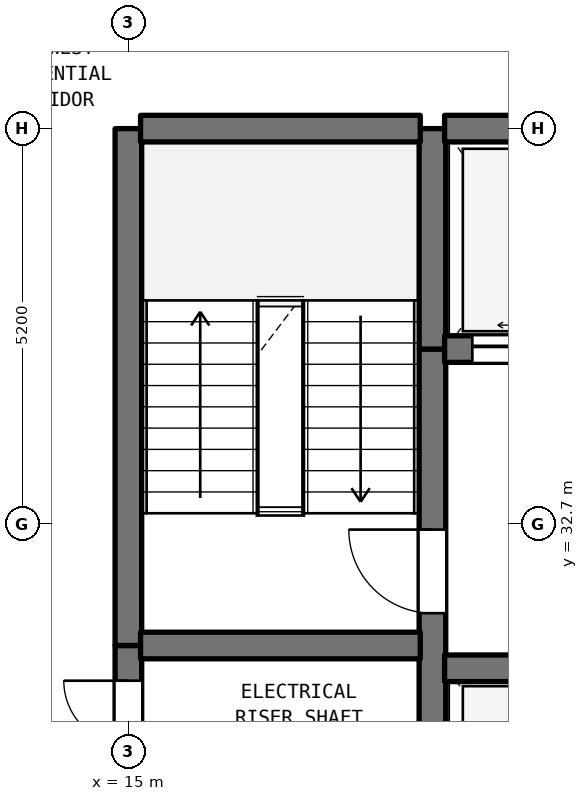
"""IFC4 building model, lengths in metres.
Left out: names, types, materials, properties, quantities, classifications, styles, units other than length and angle.
Written with IfcOpenShell. Run it as: python <this file> out.ifc"""

import sys

from ifc_helpers import new_model, si_unit, direction, frame, frame_2d, origin, place, context, subcontext, project, spatial, rectangle, extrude, element, fill, save


model = new_model("IFC4")
c1 = context("Model", 3, precision=1e-05, world=origin(), true_north=direction((0.0, 1.0)))
c2 = subcontext(c1, "Body", "Model", "MODEL_VIEW")
j1 = project(units=[si_unit("LENGTHUNIT", "METRE"), si_unit("PLANEANGLEUNIT", "RADIAN")], contexts=[c1])
p1 = place(None, origin())
s1 = spatial("IfcSite", under=j1, at=p1, CompositionType="ELEMENT")
p2 = place(p1, origin())
s2 = spatial("IfcBuilding", under=s1, at=p2, CompositionType="ELEMENT")
p3 = place(p2, frame((0.0, 0.0, 105.7)))
s3 = spatial("IfcBuildingStorey", under=s2, at=p3, CompositionType="ELEMENT", Elevation=105.7)
p4 = place(p3, frame((15.0, 29.5, 0.0), z_axis=(0.0, 0.0, 1.0), x_axis=(0.0, 1.0, 0.0)))
e1 = element("IfcWall", 1, at=p4, inside=s3, PredefinedType="SHEAR", context=c2, shape_type="SweptSolid", body=[
    extrude(rectangle(XDim=1.6, YDim=0.35, at=frame_2d((0.8, 0.0))), origin(), (0.0, 0.0, 1.0), 3.385),
])
p5 = place(p4, frame((0.287, 0.0, 0.0)))
e2 = element("IfcOpeningElement", 2, at=p5, cuts=e1, PredefinedType="OPENING", context=c2, shape_type="SweptSolid", body=[
    extrude(rectangle(XDim=0.85, YDim=2.1, at=frame_2d((0.425, 1.05))), frame((0.0, 0.185, 0.0), z_axis=(0.0, -1.0, 0.0), x_axis=(1.0, 0.0, 0.0)), (0.0, 0.0, 1.0), 0.37),
])
p6 = place(p3, frame((15.0, 31.1, 0.0), z_axis=(0.0, 0.0, 1.0), x_axis=(0.0, 1.0, 0.0)))
e3 = element("IfcWall", 3, at=p6, inside=s3, PredefinedType="SHEAR", context=c2, shape_type="SweptSolid", body=[
    extrude(rectangle(XDim=6.8, YDim=0.35, at=frame_2d((3.4, 0.0))), origin(), (0.0, 0.0, 1.0), 3.385),
])
p7 = place(p3, frame((19.0, 29.5, 0.0), z_axis=(0.0, 0.0, 1.0), x_axis=(0.0, 1.0, 0.0)))
e4 = element("IfcWall", 4, at=p7, inside=s3, PredefinedType="SHEAR", context=c2, shape_type="SweptSolid", body=[
    extrude(rectangle(XDim=5.5, YDim=0.35, at=frame_2d((2.75, 0.0))), origin(), (0.0, 0.0, 1.0), 3.385),
])
p8 = place(p7, frame((2.025, 0.0, 0.0)))
e5 = element("IfcOpeningElement", 5, at=p8, cuts=e4, PredefinedType="OPENING", context=c2, shape_type="SweptSolid", body=[
    extrude(rectangle(XDim=1.1, YDim=2.15, at=frame_2d((0.55, 1.075))), frame((0.0, 0.185, 0.0), z_axis=(0.0, -1.0, 0.0), x_axis=(1.0, 0.0, 0.0)), (0.0, 0.0, 1.0), 0.37),
])
p9 = place(p3, frame((19.0, 35.0, 0.0), z_axis=(0.0, 0.0, 1.0), x_axis=(0.0, 1.0, 0.0)))
e6 = element("IfcWall", 6, at=p9, inside=s3, PredefinedType="SHEAR", context=c2, shape_type="SweptSolid", body=[
    extrude(rectangle(XDim=2.9, YDim=0.35, at=frame_2d((1.45, 0.0))), origin(), (0.0, 0.0, 1.0), 3.385),
])
p10 = place(p3, frame((19.16, 30.8, 0.0), z_axis=(0.0, 0.0, 1.0), x_axis=(1.0, 0.0, 0.0)))
e7 = element("IfcWall", 7, at=p10, inside=s3, PredefinedType="SHEAR", context=c2, shape_type="SweptSolid", body=[
    extrude(rectangle(XDim=4.48, YDim=0.35, at=frame_2d((2.24, 0.0))), origin(), (0.0, 0.0, 1.0), 3.385),
])
p11 = place(p3, frame((15.16, 31.1, 0.0), z_axis=(0.0, 0.0, 1.0), x_axis=(1.0, 0.0, 0.0)))
e8 = element("IfcWall", 8, at=p11, inside=s3, PredefinedType="SHEAR", context=c2, shape_type="SweptSolid", body=[
    extrude(rectangle(XDim=3.68, YDim=0.35, at=frame_2d((1.84, 0.0))), origin(), (0.0, 0.0, 1.0), 3.385),
])
p12 = place(p3, frame((19.16, 35.0, 0.0), z_axis=(0.0, 0.0, 1.0), x_axis=(1.0, 0.0, 0.0)))
e9 = element("IfcWall", 9, at=p12, inside=s3, PredefinedType="SHEAR", context=c2, shape_type="SweptSolid", body=[
    extrude(rectangle(XDim=11.48, YDim=0.35, at=frame_2d((5.74, 0.0))), origin(), (0.0, 0.0, 1.0), 3.385),
])
p13 = place(p12, frame((0.365, 0.0, 0.0)))
e10 = element("IfcOpeningElement", 10, at=p13, cuts=e9, PredefinedType="OPENING", context=c2, shape_type="SweptSolid", body=[
    extrude(rectangle(XDim=1.35, YDim=2.2, at=frame_2d((0.675, 1.1))), frame((0.0, 0.185, 0.0), z_axis=(0.0, -1.0, 0.0), x_axis=(1.0, 0.0, 0.0)), (0.0, 0.0, 1.0), 0.37),
])
p14 = place(p12, frame((2.765, 0.0, 0.0)))
e11 = element("IfcOpeningElement", 11, at=p14, cuts=e9, PredefinedType="OPENING", context=c2, shape_type="SweptSolid", body=[
    extrude(rectangle(XDim=1.35, YDim=2.2, at=frame_2d((0.675, 1.1))), frame((0.0, 0.185, 0.0), z_axis=(0.0, -1.0, 0.0), x_axis=(1.0, 0.0, 0.0)), (0.0, 0.0, 1.0), 0.37),
])
p15 = place(p12, frame((4.915, 0.0, 0.0)))
e12 = element("IfcOpeningElement", 12, at=p15, cuts=e9, PredefinedType="OPENING", context=c2, shape_type="SweptSolid", body=[
    extrude(rectangle(XDim=1.2, YDim=2.2, at=frame_2d((0.6, 1.1))), frame((0.0, 0.185, 0.0), z_axis=(0.0, -1.0, 0.0), x_axis=(1.0, 0.0, 0.0)), (0.0, 0.0, 1.0), 0.37),
])
p16 = place(p12, frame((6.665, 0.0, 0.0)))
e13 = element("IfcOpeningElement", 13, at=p16, cuts=e9, PredefinedType="OPENING", context=c2, shape_type="SweptSolid", body=[
    extrude(rectangle(XDim=1.2, YDim=2.2, at=frame_2d((0.6, 1.1))), frame((0.0, 0.185, 0.0), z_axis=(0.0, -1.0, 0.0), x_axis=(1.0, 0.0, 0.0)), (0.0, 0.0, 1.0), 0.37),
])
p17 = place(p12, frame((8.415, 0.0, 0.0)))
e14 = element("IfcOpeningElement", 14, at=p17, cuts=e9, PredefinedType="OPENING", context=c2, shape_type="SweptSolid", body=[
    extrude(rectangle(XDim=1.2, YDim=2.2, at=frame_2d((0.6, 1.1))), frame((0.0, 0.185, 0.0), z_axis=(0.0, -1.0, 0.0), x_axis=(1.0, 0.0, 0.0)), (0.0, 0.0, 1.0), 0.37),
])
p18 = place(p12, frame((10.16, 0.0, 0.0)))
e15 = element("IfcOpeningElement", 15, at=p18, cuts=e9, PredefinedType="OPENING", context=c2, shape_type="SweptSolid", body=[
    extrude(rectangle(XDim=1.2, YDim=2.2, at=frame_2d((0.6, 1.1))), frame((0.0, 0.185, 0.0), z_axis=(0.0, -1.0, 0.0), x_axis=(1.0, 0.0, 0.0)), (0.0, 0.0, 1.0), 0.37),
])
p19 = place(p3, frame((15.16, 37.9, 0.0), z_axis=(0.0, 0.0, 1.0), x_axis=(1.0, 0.0, 0.0)))
e16 = element("IfcWall", 16, at=p19, inside=s3, PredefinedType="SHEAR", context=c2, shape_type="SweptSolid", body=[
    extrude(rectangle(XDim=3.68, YDim=0.35, at=frame_2d((1.84, 0.0))), origin(), (0.0, 0.0, 1.0), 3.385),
])
p20 = place(p3, frame((19.16, 37.9, 0.0), z_axis=(0.0, 0.0, 1.0), x_axis=(1.0, 0.0, 0.0)))
e17 = element("IfcWall", 17, at=p20, inside=s3, PredefinedType="SHEAR", context=c2, shape_type="SweptSolid", body=[
    extrude(rectangle(XDim=11.48, YDim=0.35, at=frame_2d((5.74, 0.0))), origin(), (0.0, 0.0, 1.0), 3.385),
])
p21 = place(p5, origin())
e18 = element("IfcDoor", 18, at=p21, inside=s3, OperationType="SINGLE_SWING_RIGHT", PredefinedType="DOOR", context=c2, shape_type="SweptSolid", body=[
    extrude(rectangle(XDim=0.85, YDim=2.1, at=frame_2d((0.425, 1.05))), frame((0.0, 0.025, 0.0), z_axis=(0.0, -1.0, 0.0), x_axis=(1.0, 0.0, 0.0)), (0.0, 0.0, 1.0), 0.05),
])
fill(e2, e18)
p22 = place(p8, origin())
e19 = element("IfcDoor", 19, at=p22, inside=s3, OperationType="SINGLE_SWING_RIGHT", PredefinedType="DOOR", context=c2, shape_type="SweptSolid", body=[
    extrude(rectangle(XDim=1.1, YDim=2.15, at=frame_2d((0.55, 1.075))), frame((0.0, 0.025, 0.0), z_axis=(0.0, -1.0, 0.0), x_axis=(1.0, 0.0, 0.0)), (0.0, 0.0, 1.0), 0.05),
])
fill(e5, e19)
p23 = place(p13, origin())
e20 = element("IfcDoor", 20, at=p23, inside=s3, OperationType="DOUBLE_DOOR_SLIDING", PredefinedType="DOOR", context=c2, shape_type="SweptSolid", body=[
    extrude(rectangle(XDim=1.35, YDim=2.2, at=frame_2d((0.675, 1.1))), frame((0.0, 0.025, 0.0), z_axis=(0.0, -1.0, 0.0), x_axis=(1.0, 0.0, 0.0)), (0.0, 0.0, 1.0), 0.05),
])
fill(e10, e20)
save(model, sys.argv[1])
